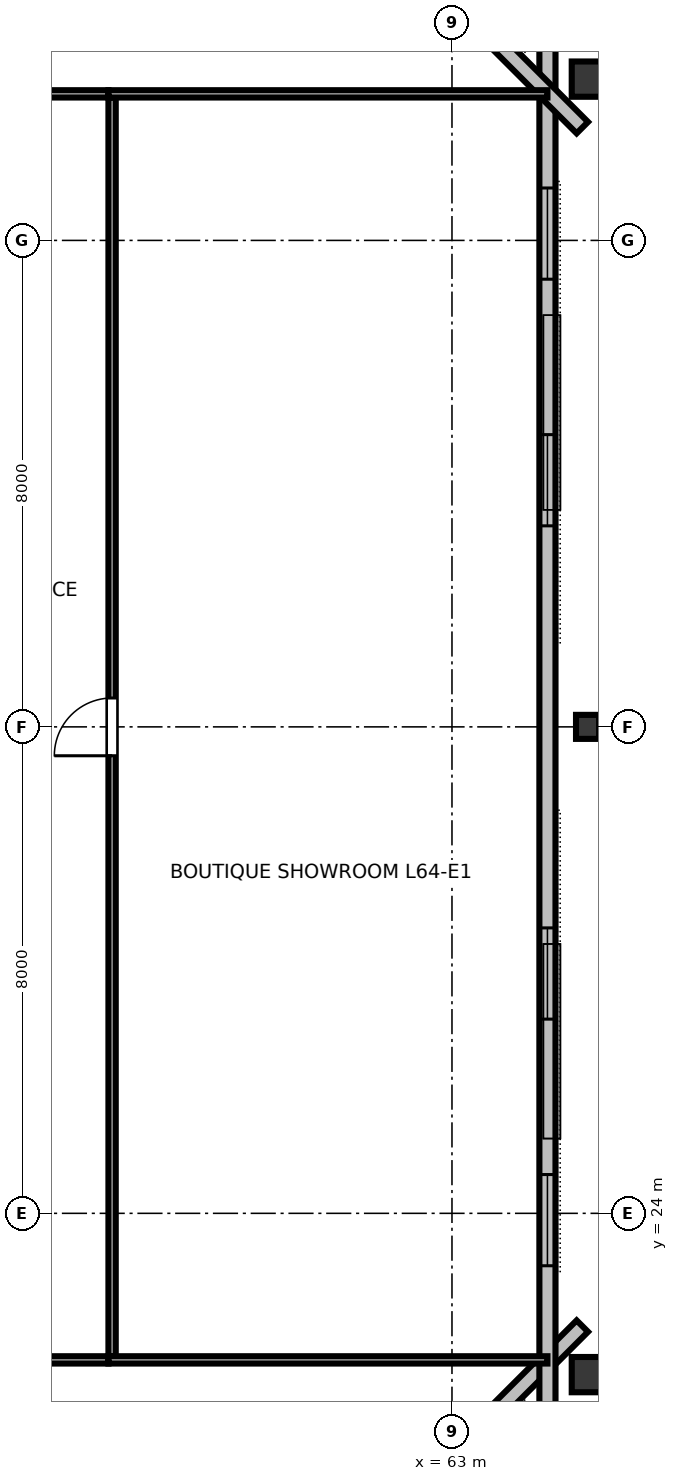
"""IFC4 building model, lengths in metres.
Left out: names, types, materials, properties, quantities, classifications, styles, units other than length and angle.
Written with IfcOpenShell. Run it as: python <this file> out.ifc"""

import sys

from ifc_helpers import new_model, si_unit, direction, frame, frame_2d, origin, origin_2d, place, context, subcontext, project, spatial, rectangle, hollow_rectangle, i_section, extrude, element, fill, save


model = new_model("IFC4")
c1 = context("Model", 3, precision=1e-05, world=origin(), true_north=direction((0.0, 1.0)))
c2 = subcontext(c1, "Body", "Model", "MODEL_VIEW")
j1 = project(units=[si_unit("LENGTHUNIT", "METRE"), si_unit("PLANEANGLEUNIT", "RADIAN")], contexts=[c1])
p1 = place(None, origin())
s1 = spatial("IfcSite", under=j1, at=p1, CompositionType="ELEMENT")
p2 = place(p1, origin())
s2 = spatial("IfcBuilding", under=s1, at=p2, CompositionType="ELEMENT")
p3 = place(p2, frame((0.0, 0.0, 243.0)))
s3 = spatial("IfcBuildingStorey", under=s2, at=p3, CompositionType="ELEMENT", Elevation=243.0)
p4 = place(p3, frame((65.32, 21.348, 0.0), z_axis=(0.0, 0.0, 1.0), x_axis=(0.0, 1.0, 0.0)))
e1 = element("IfcColumn", 1, at=p4, inside=s3, PredefinedType="COLUMN", context=c2, shape_type="SweptSolid", body=[
    extrude(hollow_rectangle(XDim=0.58, YDim=0.7, WallThickness=0.032, at=origin_2d()), origin(), (0.0, 0.0, 1.0), 3.373),
])
p5 = place(p3, frame((65.23, 32.0, 0.0), z_axis=(0.0, 0.0, 1.0), x_axis=(0.0, 1.0, 0.0)))
e2 = element("IfcColumn", 2, at=p5, inside=s3, PredefinedType="COLUMN", context=c2, shape_type="SweptSolid", body=[
    extrude(i_section(OverallWidth=0.395, OverallDepth=0.38, WebThickness=0.019, FlangeThickness=0.03, FilletRadius=0.025, at=origin_2d()), origin(), (0.0, 0.0, 1.0), 3.373),
])
p6 = place(p3, frame((65.32, 42.652, 0.0), z_axis=(0.0, 0.0, 1.0), x_axis=(0.0, 1.0, 0.0)))
e3 = element("IfcColumn", 3, at=p6, inside=s3, PredefinedType="COLUMN", context=c2, shape_type="SweptSolid", body=[
    extrude(hollow_rectangle(XDim=0.58, YDim=0.7, WallThickness=0.032, at=origin_2d()), origin(), (0.0, 0.0, 1.0), 3.373),
])
p7 = place(p3, frame((57.604, 14.606, 0.0), z_axis=(0.0, 0.0, 1.0), x_axis=(0.707106781187, 0.707106781187, 0.0)))
e4 = element("IfcWall", 4, at=p7, inside=s3, PredefinedType="STANDARD", context=c2, shape_type="SweptSolid", body=[
    extrude(rectangle(XDim=10.662, YDim=0.265, at=frame_2d((5.331, 0.0))), origin(), (0.0, 0.0, 1.0), 3.375),
])
p8 = place(p3, frame((64.57, 20.76, 0.0), z_axis=(0.0, 0.0, 1.0), x_axis=(0.0, 1.0, 0.0)))
e5 = element("IfcWall", 5, at=p8, inside=s3, PredefinedType="STANDARD", context=c2, shape_type="SweptSolid", body=[
    extrude(rectangle(XDim=22.48, YDim=0.265, at=frame_2d((11.24, 0.0))), origin(), (0.0, 0.0, 1.0), 3.375),
])
p9 = place(p8, frame((2.378, 0.0, 0.85)))
e6 = element("IfcOpeningElement", 6, at=p9, cuts=e5, PredefinedType="OPENING", context=c2, shape_type="SweptSolid", body=[
    extrude(rectangle(XDim=1.5, YDim=1.85, at=frame_2d((0.75, 0.925))), frame((0.0, 0.142, 0.0), z_axis=(0.0, -1.0, 0.0), x_axis=(1.0, 0.0, 0.0)), (0.0, 0.0, 1.0), 0.285),
])
p10 = place(p8, frame((6.434, 0.0, 0.85)))
e7 = element("IfcOpeningElement", 7, at=p10, cuts=e5, PredefinedType="OPENING", context=c2, shape_type="SweptSolid", body=[
    extrude(rectangle(XDim=1.5, YDim=1.85, at=frame_2d((0.75, 0.925))), frame((0.0, 0.142, 0.0), z_axis=(0.0, -1.0, 0.0), x_axis=(1.0, 0.0, 0.0)), (0.0, 0.0, 1.0), 0.285),
])
p11 = place(p8, frame((14.546, 0.0, 0.85)))
e8 = element("IfcOpeningElement", 8, at=p11, cuts=e5, PredefinedType="OPENING", context=c2, shape_type="SweptSolid", body=[
    extrude(rectangle(XDim=1.5, YDim=1.85, at=frame_2d((0.75, 0.925))), frame((0.0, 0.142, 0.0), z_axis=(0.0, -1.0, 0.0), x_axis=(1.0, 0.0, 0.0)), (0.0, 0.0, 1.0), 0.285),
])
p12 = place(p8, frame((18.602, 0.0, 0.85)))
e9 = element("IfcOpeningElement", 9, at=p12, cuts=e5, PredefinedType="OPENING", context=c2, shape_type="SweptSolid", body=[
    extrude(rectangle(XDim=1.5, YDim=1.85, at=frame_2d((0.75, 0.925))), frame((0.0, 0.142, 0.0), z_axis=(0.0, -1.0, 0.0), x_axis=(1.0, 0.0, 0.0)), (0.0, 0.0, 1.0), 0.285),
])
p13 = place(p3, frame((65.144, 41.854, 0.0), z_axis=(0.0, 0.0, 1.0), x_axis=(-0.707106781187, 0.707106781187, 0.0)))
e10 = element("IfcWall", 10, at=p13, inside=s3, PredefinedType="STANDARD", context=c2, shape_type="SweptSolid", body=[
    extrude(rectangle(XDim=10.662, YDim=0.265, at=frame_2d((5.331, 0.0))), origin(), (0.0, 0.0, 1.0), 3.375),
])
p14 = place(p3, frame((47.02, 21.59, 0.0), z_axis=(0.0, 0.0, 1.0), x_axis=(1.0, 0.0, 0.0)))
e11 = element("IfcWall", 11, at=p14, inside=s3, PredefinedType="PARTITIONING", context=c2, shape_type="SweptSolid", body=[
    extrude(rectangle(XDim=10.33, YDim=0.12, at=frame_2d((5.165, 0.0))), origin(), (0.0, 0.0, 1.0), 2.655),
])
p15 = place(p14, frame((4.62, 0.0, 0.0)))
e12 = element("IfcOpeningElement", 12, at=p15, cuts=e11, PredefinedType="OPENING", context=c2, shape_type="SweptSolid", body=[
    extrude(rectangle(XDim=0.95, YDim=2.15, at=frame_2d((0.475, 1.075))), frame((0.0, 0.07, 0.0), z_axis=(0.0, -1.0, 0.0), x_axis=(1.0, 0.0, 0.0)), (0.0, 0.0, 1.0), 0.14),
])
p16 = place(p3, frame((47.02, 42.41, 0.0), z_axis=(0.0, 0.0, 1.0), x_axis=(1.0, 0.0, 0.0)))
e13 = element("IfcWall", 13, at=p16, inside=s3, PredefinedType="PARTITIONING", context=c2, shape_type="SweptSolid", body=[
    extrude(rectangle(XDim=10.33, YDim=0.12, at=frame_2d((5.165, 0.0))), origin(), (0.0, 0.0, 1.0), 2.655),
])
p17 = place(p16, frame((0.81, 0.0, 0.0)))
e14 = element("IfcOpeningElement", 14, at=p17, cuts=e13, PredefinedType="OPENING", context=c2, shape_type="SweptSolid", body=[
    extrude(rectangle(XDim=0.95, YDim=2.15, at=frame_2d((0.475, 1.075))), frame((0.0, 0.07, 0.0), z_axis=(0.0, -1.0, 0.0), x_axis=(1.0, 0.0, 0.0)), (0.0, 0.0, 1.0), 0.14),
])
p18 = place(p16, frame((5.905, 0.0, 0.0)))
e15 = element("IfcOpeningElement", 15, at=p18, cuts=e13, PredefinedType="OPENING", context=c2, shape_type="SweptSolid", body=[
    extrude(rectangle(XDim=0.95, YDim=2.15, at=frame_2d((0.475, 1.075))), frame((0.0, 0.07, 0.0), z_axis=(0.0, -1.0, 0.0), x_axis=(1.0, 0.0, 0.0)), (0.0, 0.0, 1.0), 0.14),
])
p19 = place(p3, frame((57.41, 21.65, 0.0), z_axis=(0.0, 0.0, 1.0), x_axis=(0.0, 1.0, 0.0)))
e16 = element("IfcWall", 16, at=p19, inside=s3, PredefinedType="PARTITIONING", context=c2, shape_type="SweptSolid", body=[
    extrude(rectangle(XDim=20.7, YDim=0.12, at=frame_2d((10.35, 0.0))), origin(), (0.0, 0.0, 1.0), 2.655),
])
p20 = place(p19, frame((9.875, 0.0, 0.0)))
e17 = element("IfcOpeningElement", 17, at=p20, cuts=e16, PredefinedType="OPENING", context=c2, shape_type="SweptSolid", body=[
    extrude(rectangle(XDim=0.95, YDim=2.15, at=frame_2d((0.475, 1.075))), frame((0.0, 0.07, 0.0), z_axis=(0.0, -1.0, 0.0), x_axis=(1.0, 0.0, 0.0)), (0.0, 0.0, 1.0), 0.14),
])
for number, where, z_axis, x_axis in (
    (18, (57.35, 21.59, 0.0), (0.0, 0.0, 1.0), (1.0, 0.0, 0.0)),
    (19, (57.35, 42.41, 0.0), (0.0, 0.0, 1.0), (1.0, 0.0, 0.0)),
):
    element("IfcWall", number, at=place(p3, frame(where, z_axis=z_axis, x_axis=x_axis)), inside=s3, PredefinedType="PARTITIONING", context=c2, shape_type="SweptSolid", body=[
        extrude(rectangle(XDim=7.22, YDim=0.12, at=frame_2d((3.61, 0.0))), origin(), (0.0, 0.0, 1.0), 2.655),
    ])
p21 = place(p9, origin())
e20 = element("IfcWindow", 20, at=p21, inside=s3, PartitioningType="SINGLE_PANEL", PredefinedType="WINDOW", context=c2, shape_type="SweptSolid", body=[
    extrude(rectangle(XDim=1.5, YDim=1.85, at=frame_2d((0.75, 0.925))), frame((0.0, 0.03, 0.0), z_axis=(0.0, -1.0, 0.0), x_axis=(1.0, 0.0, 0.0)), (0.0, 0.0, 1.0), 0.06),
])
fill(e6, e20)
p22 = place(p10, origin())
e21 = element("IfcWindow", 21, at=p22, inside=s3, PartitioningType="SINGLE_PANEL", PredefinedType="WINDOW", context=c2, shape_type="SweptSolid", body=[
    extrude(rectangle(XDim=1.5, YDim=1.85, at=frame_2d((0.75, 0.925))), frame((0.0, 0.03, 0.0), z_axis=(0.0, -1.0, 0.0), x_axis=(1.0, 0.0, 0.0)), (0.0, 0.0, 1.0), 0.06),
])
fill(e7, e21)
p23 = place(p11, origin())
e22 = element("IfcWindow", 22, at=p23, inside=s3, PartitioningType="SINGLE_PANEL", PredefinedType="WINDOW", context=c2, shape_type="SweptSolid", body=[
    extrude(rectangle(XDim=1.5, YDim=1.85, at=frame_2d((0.75, 0.925))), frame((0.0, 0.03, 0.0), z_axis=(0.0, -1.0, 0.0), x_axis=(1.0, 0.0, 0.0)), (0.0, 0.0, 1.0), 0.06),
])
fill(e8, e22)
p24 = place(p12, origin())
e23 = element("IfcWindow", 23, at=p24, inside=s3, PartitioningType="SINGLE_PANEL", PredefinedType="WINDOW", context=c2, shape_type="SweptSolid", body=[
    extrude(rectangle(XDim=1.5, YDim=1.85, at=frame_2d((0.75, 0.925))), frame((0.0, 0.03, 0.0), z_axis=(0.0, -1.0, 0.0), x_axis=(1.0, 0.0, 0.0)), (0.0, 0.0, 1.0), 0.06),
])
fill(e9, e23)
p25 = place(p20, origin())
e24 = element("IfcDoor", 24, at=p25, inside=s3, OperationType="SINGLE_SWING_LEFT", PredefinedType="DOOR", context=c2, shape_type="SweptSolid", body=[
    extrude(rectangle(XDim=0.95, YDim=2.15, at=frame_2d((0.475, 1.075))), frame((0.0, 0.025, 0.0), z_axis=(0.0, -1.0, 0.0), x_axis=(1.0, 0.0, 0.0)), (0.0, 0.0, 1.0), 0.05),
])
fill(e17, e24)
save(model, sys.argv[1])
